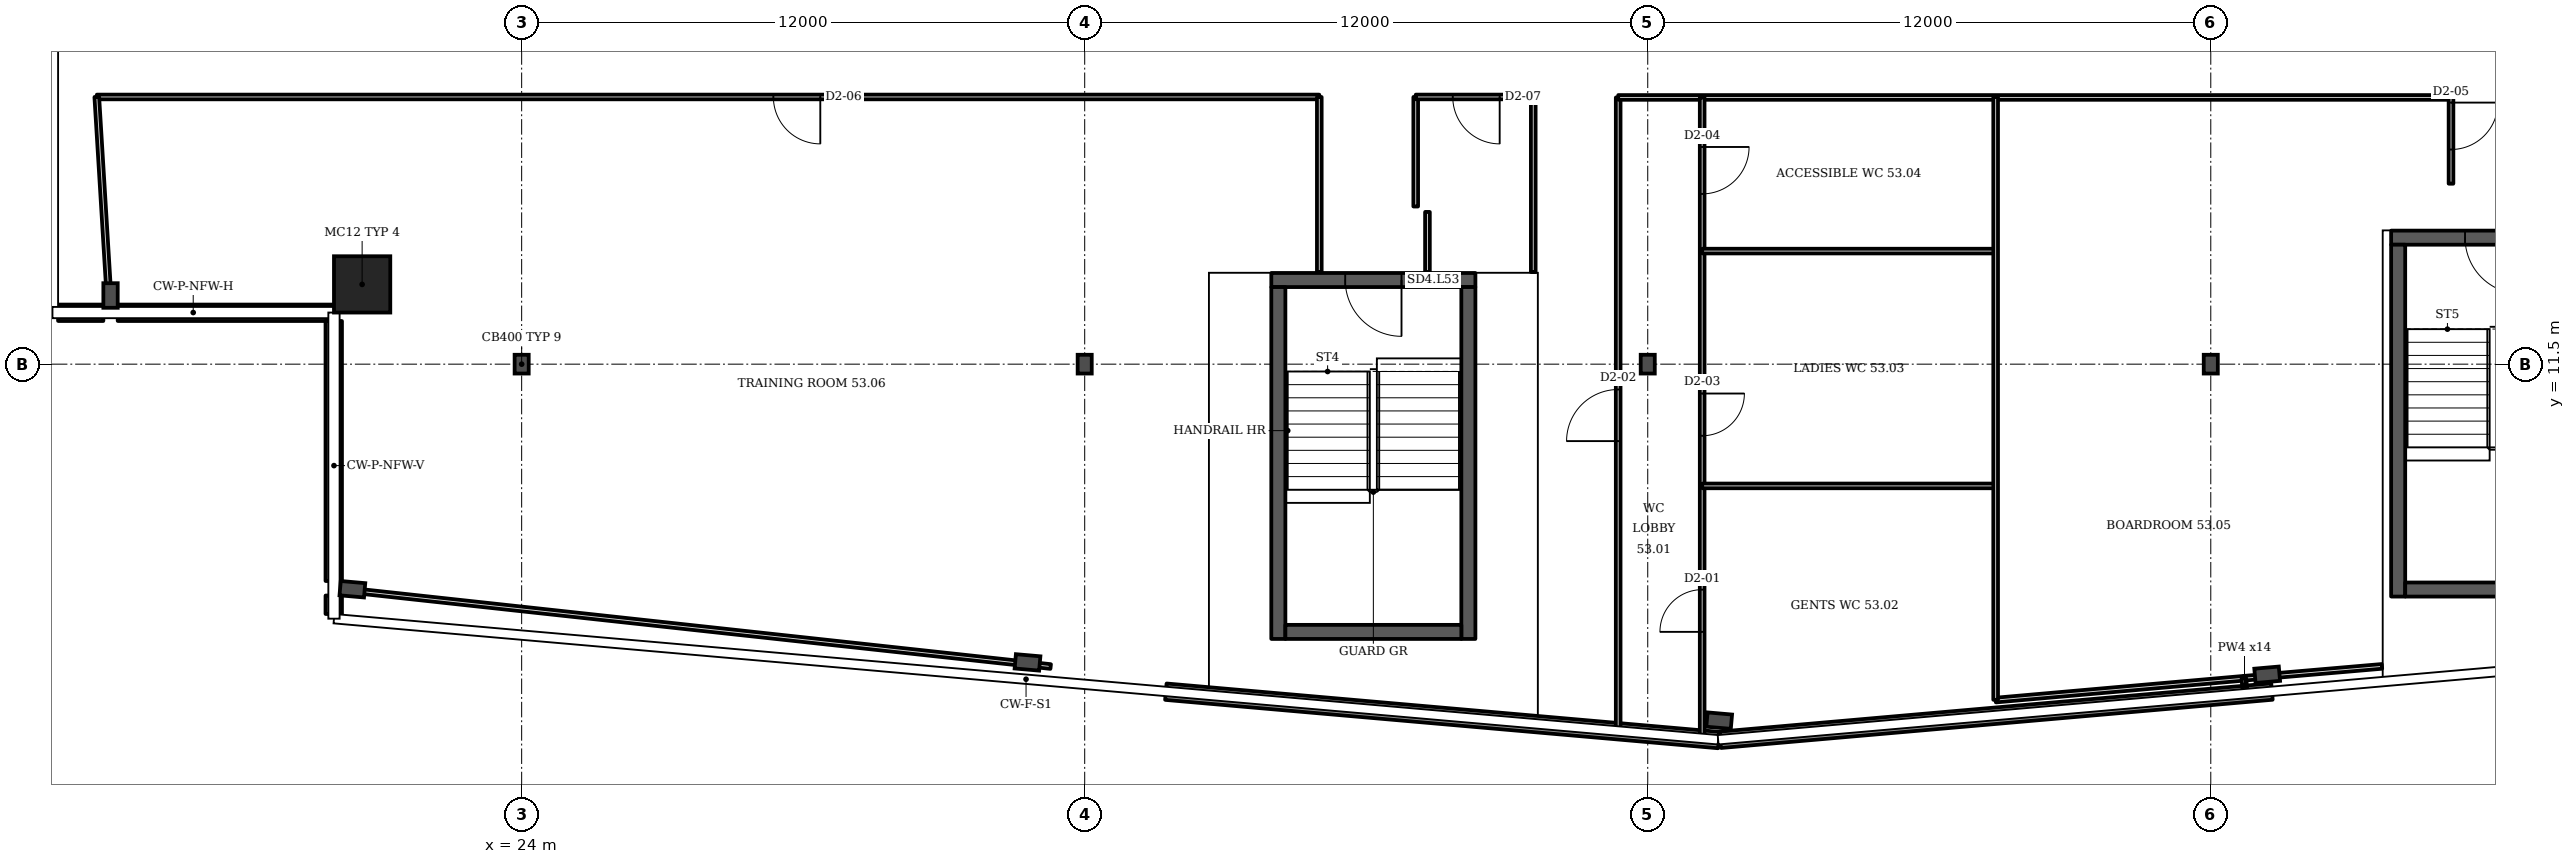
"""IFC4 building model, lengths in metres.
Left out: names, types, materials, properties, quantities, classifications, styles, units other than length and angle.
Written with IfcOpenShell. Run it as: python <this file> out.ifc"""

import sys

from ifc_helpers import new_model, si_unit, direction, frame, frame_2d, origin, origin_2d, place, context, subcontext, project, spatial, rectangle, i_section, extrude, element, fill, save


model = new_model("IFC4")
c1 = context("Model", 3, precision=1e-05, world=origin(), true_north=direction((0.0, 1.0)))
c2 = subcontext(c1, "Body", "Model", "MODEL_VIEW")
j1 = project(units=[si_unit("LENGTHUNIT", "METRE"), si_unit("PLANEANGLEUNIT", "RADIAN")], contexts=[c1])
p1 = place(None, origin())
s1 = spatial("IfcSite", under=j1, at=p1, CompositionType="ELEMENT")
p2 = place(p1, origin())
s2 = spatial("IfcBuilding", under=s1, at=p2, CompositionType="ELEMENT")
p3 = place(p2, frame((0.0, 0.0, 214.3)))
s3 = spatial("IfcBuildingStorey", under=s2, at=p3, CompositionType="ELEMENT", Elevation=214.3)
p4 = place(p3, frame((20.6, 13.2, 0.0), z_axis=(0.0, 0.0, 1.0), x_axis=(1.0, 0.0, 0.0)))
e1 = element("IfcColumn", 1, at=p4, inside=s3, PredefinedType="COLUMN", context=c2, shape_type="SweptSolid", body=[
    extrude(rectangle(XDim=1.2, YDim=1.2, at=origin_2d()), origin(), (0.0, 0.0, 1.0), 3.6),
])
for number, where, z_axis, x_axis in (
    (2, (20.392, 6.703, 0.0), (0.0, 0.0, 1.0), (-0.087, -0.996, 0.0)),
    (3, (34.781, 5.143, 0.0), (0.0, 0.0, 1.0), (-0.087, -0.996, 0.0)),
    (4, (49.523, 3.902, 0.0), (0.0, 0.0, 1.0), (-0.087, -0.996, 0.0)),
    (5, (61.202, 4.879, 0.0), (0.0, 0.0, 1.0), (0.087, -0.996, 0.0)),
    (6, (15.238, 12.963, 0.0), (0.0, 0.0, 1.0), (-1.0, 0.0, 0.0)),
):
    element("IfcColumn", number, at=place(p3, frame(where, z_axis=z_axis, x_axis=x_axis)), inside=s3, PredefinedType="COLUMN", context=c2, shape_type="SweptSolid", body=[
        extrude(i_section(OverallWidth=0.306, OverallDepth=0.524, WebThickness=0.021, FlangeThickness=0.04, FilletRadius=0.027, at=origin_2d()), origin(), (0.0, 0.0, 1.0), 3.6),
    ])
for number, where, z_axis, x_axis in (
    (7, (24.0, 11.5, 0.0), (0.0, 0.0, 1.0), (1.0, 0.0, 0.0)),
    (8, (36.0, 11.5, 0.0), (0.0, 0.0, 1.0), (1.0, 0.0, 0.0)),
    (9, (48.0, 11.5, 0.0), (0.0, 0.0, 1.0), (1.0, 0.0, 0.0)),
    (10, (60.0, 11.5, 0.0), (0.0, 0.0, 1.0), (1.0, 0.0, 0.0)),
):
    element("IfcColumn", number, at=place(p3, frame(where, z_axis=z_axis, x_axis=x_axis)), inside=s3, PredefinedType="COLUMN", context=c2, shape_type="SweptSolid", body=[
        extrude(i_section(OverallWidth=0.3, OverallDepth=0.4, WebThickness=0.013, FlangeThickness=0.024, FilletRadius=0.027, at=origin_2d()), origin(), (0.0, 0.0, 1.0), 3.6),
    ])
p5 = place(p3, frame((37.729, 4.519, 0.0), z_axis=(0.0, 0.0, 1.0), x_axis=(0.99619, -0.087167, 0.0)))
e11 = element("IfcWall", 11, at=p5, inside=s3, PredefinedType="SOLIDWALL", context=c2, shape_type="SweptSolid", body=[
    extrude(rectangle(XDim=11.831, YDim=0.35, at=frame_2d((5.915, 0.0))), origin(), (0.0, 0.0, 1.0), 1.0),
])
p6 = place(p3, frame((49.545, 3.493, 0.0), z_axis=(0.0, 0.0, 1.0), x_axis=(0.996196, 0.087141, 0.0)))
e12 = element("IfcWall", 12, at=p6, inside=s3, PredefinedType="SOLIDWALL", context=c2, shape_type="SweptSolid", body=[
    extrude(rectangle(XDim=11.803, YDim=0.35, at=frame_2d((5.902, 0.0))), origin(), (0.0, 0.0, 1.0), 1.0),
])
p7 = place(p3, frame((14.12, 12.595, 0.0), z_axis=(0.0, 0.0, 1.0), x_axis=(1.0, 0.0, 0.0)))
e13 = element("IfcWall", 13, at=p7, inside=s3, PredefinedType="SOLIDWALL", context=c2, shape_type="SweptSolid", body=[
    extrude(rectangle(XDim=0.965, YDim=0.35, at=frame_2d((0.482, 0.0))), origin(), (0.0, 0.0, 1.0), 1.0),
])
p8 = place(p3, frame((15.391, 12.595, 0.0), z_axis=(0.0, 0.0, 1.0), x_axis=(1.0, 0.0, 0.0)))
e14 = element("IfcWall", 14, at=p8, inside=s3, PredefinedType="SOLIDWALL", context=c2, shape_type="SweptSolid", body=[
    extrude(rectangle(XDim=4.609, YDim=0.35, at=frame_2d((2.305, 0.0))), origin(), (0.0, 0.0, 1.0), 1.0),
])
p9 = place(p3, frame((19.995, 12.42, 0.0), z_axis=(0.0, 0.0, 1.0), x_axis=(0.0, -1.0, 0.0)))
e15 = element("IfcWall", 15, at=p9, inside=s3, PredefinedType="SOLIDWALL", context=c2, shape_type="SweptSolid", body=[
    extrude(rectangle(XDim=5.542, YDim=0.35, at=frame_2d((2.771, 0.0))), origin(), (0.0, 0.0, 1.0), 1.0),
])
p10 = place(p3, frame((19.995, 6.568, 0.0), z_axis=(0.0, 0.0, 1.0), x_axis=(0.0, -1.0, 0.0)))
e16 = element("IfcWall", 16, at=p10, inside=s3, PredefinedType="SOLIDWALL", context=c2, shape_type="SweptSolid", body=[
    extrude(rectangle(XDim=0.394, YDim=0.35, at=frame_2d((0.197, 0.0))), origin(), (0.0, 0.0, 1.0), 1.0),
])
p11 = place(p3, frame((39.977, 13.293, 0.0), z_axis=(0.0, 0.0, 1.0), x_axis=(1.0, 0.0, 0.0)))
e17 = element("IfcWall", 17, at=p11, inside=s3, PredefinedType="SHEAR", context=c2, shape_type="SweptSolid", body=[
    extrude(rectangle(XDim=4.35, YDim=0.3, at=frame_2d((2.175, 0.0))), origin(), (0.0, 0.0, 1.0), 3.2),
])
p12 = place(p11, frame((1.575, 0.0, 0.0)))
e18 = element("IfcOpeningElement", 18, at=p12, cuts=e17, PredefinedType="OPENING", context=c2, shape_type="SweptSolid", body=[
    extrude(rectangle(XDim=1.2, YDim=2.1, at=frame_2d((0.6, 1.05))), frame((0.0, 0.16, 0.0), z_axis=(0.0, -1.0, 0.0), x_axis=(1.0, 0.0, 0.0)), (0.0, 0.0, 1.0), 0.32),
])
p13 = place(p3, frame((63.844, 14.196, 0.0), z_axis=(0.0, 0.0, 1.0), x_axis=(1.0, 0.0, 0.0)))
e19 = element("IfcWall", 19, at=p13, inside=s3, PredefinedType="SHEAR", context=c2, shape_type="SweptSolid", body=[
    extrude(rectangle(XDim=4.35, YDim=0.3, at=frame_2d((2.175, 0.0))), origin(), (0.0, 0.0, 1.0), 3.2),
])
p14 = place(p13, frame((1.575, 0.0, 0.0)))
e20 = element("IfcOpeningElement", 20, at=p14, cuts=e19, PredefinedType="OPENING", context=c2, shape_type="SweptSolid", body=[
    extrude(rectangle(XDim=1.2, YDim=2.1, at=frame_2d((0.6, 1.05))), frame((0.0, 0.16, 0.0), z_axis=(0.0, -1.0, 0.0), x_axis=(1.0, 0.0, 0.0)), (0.0, 0.0, 1.0), 0.32),
])
p15 = place(p3, frame((14.945, 17.195, 0.0), z_axis=(0.0, 0.0, 1.0), x_axis=(1.0, 0.0, 0.0)))
e21 = element("IfcWall", 21, at=p15, inside=s3, PredefinedType="PARTITIONING", context=c2, shape_type="SweptSolid", body=[
    extrude(rectangle(XDim=26.055, YDim=0.1, at=frame_2d((13.027, 0.0))), origin(), (0.0, 0.0, 1.0), 3.2),
])
p16 = place(p15, frame((14.42, 0.0, 0.0)))
e22 = element("IfcOpeningElement", 22, at=p16, cuts=e21, PredefinedType="OPENING", context=c2, shape_type="SweptSolid", body=[
    extrude(rectangle(XDim=1.0, YDim=2.1, at=frame_2d((0.5, 1.05))), frame((0.0, 0.06, 0.0), z_axis=(0.0, -1.0, 0.0), x_axis=(1.0, 0.0, 0.0)), (0.0, 0.0, 1.0), 0.12),
])
p17 = place(p3, frame((15.224, 12.62, 0.0), z_axis=(0.0, 0.0, 1.0), x_axis=(-0.060903, 0.99814, 0.0)))
e23 = element("IfcWall", 23, at=p17, inside=s3, PredefinedType="PARTITIONING", context=c2, shape_type="SweptSolid", body=[
    extrude(rectangle(XDim=4.586, YDim=0.1, at=frame_2d((2.293, 0.0))), origin(), (0.0, 0.0, 1.0), 2.58),
])
p18 = place(p3, frame((35.275, 5.055, 0.0), z_axis=(0.0, 0.0, 1.0), x_axis=(-0.994128, 0.108228, 0.0)))
e24 = element("IfcWall", 24, at=p18, inside=s3, PredefinedType="PARTITIONING", context=c2, shape_type="SweptSolid", body=[
    extrude(rectangle(XDim=15.335, YDim=0.1, at=frame_2d((7.667, 0.0))), origin(), (0.0, 0.0, 1.0), 2.58),
])
p19 = place(p3, frame((41.0, 13.463, 0.0), z_axis=(0.0, 0.0, 1.0), x_axis=(0.0, 1.0, 0.0)))
e25 = element("IfcWall", 25, at=p19, inside=s3, PredefinedType="PARTITIONING", context=c2, shape_type="SweptSolid", body=[
    extrude(rectangle(XDim=3.732, YDim=0.1, at=frame_2d((1.866, 0.0))), origin(), (0.0, 0.0, 1.0), 3.2),
])
p20 = place(p3, frame((43.055, 14.86, 0.0), z_axis=(0.0, 0.0, 1.0), x_axis=(0.0, 1.0, 0.0)))
e26 = element("IfcWall", 26, at=p20, inside=s3, PredefinedType="PARTITIONING", context=c2, shape_type="SweptSolid", body=[
    extrude(rectangle(XDim=2.335, YDim=0.1, at=frame_2d((1.167, 0.0))), origin(), (0.0, 0.0, 1.0), 3.2),
])
p21 = place(p3, frame((43.055, 17.195, 0.0), z_axis=(0.0, 0.0, 1.0), x_axis=(1.0, 0.0, 0.0)))
e27 = element("IfcWall", 27, at=p21, inside=s3, PredefinedType="PARTITIONING", context=c2, shape_type="SweptSolid", body=[
    extrude(rectangle(XDim=2.505, YDim=0.1, at=frame_2d((1.252, 0.0))), origin(), (0.0, 0.0, 1.0), 3.2),
])
p22 = place(p21, frame((0.789, 0.0, 0.0)))
e28 = element("IfcOpeningElement", 28, at=p22, cuts=e27, PredefinedType="OPENING", context=c2, shape_type="SweptSolid", body=[
    extrude(rectangle(XDim=1.0, YDim=2.1, at=frame_2d((0.5, 1.05))), frame((0.0, 0.06, 0.0), z_axis=(0.0, -1.0, 0.0), x_axis=(1.0, 0.0, 0.0)), (0.0, 0.0, 1.0), 0.12),
])
p23 = place(p3, frame((43.305, 13.463, 0.0), z_axis=(0.0, 0.0, 1.0), x_axis=(0.0, 1.0, 0.0)))
e29 = element("IfcWall", 29, at=p23, inside=s3, PredefinedType="PARTITIONING", context=c2, shape_type="SweptSolid", body=[
    extrude(rectangle(XDim=1.282, YDim=0.1, at=frame_2d((0.641, 0.0))), origin(), (0.0, 0.0, 1.0), 3.2),
])
p24 = place(p3, frame((45.56, 13.463, 0.0), z_axis=(0.0, 0.0, 1.0), x_axis=(0.0, 1.0, 0.0)))
e30 = element("IfcWall", 30, at=p24, inside=s3, PredefinedType="PARTITIONING", context=c2, shape_type="SweptSolid", body=[
    extrude(rectangle(XDim=3.732, YDim=0.1, at=frame_2d((1.866, 0.0))), origin(), (0.0, 0.0, 1.0), 3.2),
])
p25 = place(p3, frame((47.37, 3.701, 0.0), z_axis=(0.0, 0.0, 1.0), x_axis=(0.0, 1.0, 0.0)))
e31 = element("IfcWall", 31, at=p25, inside=s3, PredefinedType="PARTITIONING", context=c2, shape_type="SweptSolid", body=[
    extrude(rectangle(XDim=13.484, YDim=0.1, at=frame_2d((6.742, 0.0))), origin(), (0.0, 0.0, 1.0), 2.58),
])
p26 = place(p25, frame((6.159, 0.0, 0.0)))
e32 = element("IfcOpeningElement", 32, at=p26, cuts=e31, PredefinedType="OPENING", context=c2, shape_type="SweptSolid", body=[
    extrude(rectangle(XDim=1.1, YDim=2.1, at=frame_2d((0.55, 1.05))), frame((0.0, 0.06, 0.0), z_axis=(0.0, -1.0, 0.0), x_axis=(1.0, 0.0, 0.0)), (0.0, 0.0, 1.0), 0.12),
])
p27 = place(p3, frame((47.37, 17.185, 0.0), z_axis=(0.0, 0.0, 1.0), x_axis=(1.0, 0.0, 0.0)))
e33 = element("IfcWall", 33, at=p27, inside=s3, PredefinedType="PARTITIONING", context=c2, shape_type="SweptSolid", body=[
    extrude(rectangle(XDim=17.75, YDim=0.1, at=frame_2d((8.875, 0.0))), origin(), (0.0, 0.0, 1.0), 3.2),
])
p28 = place(p3, frame((49.16, 3.544, 0.0), z_axis=(0.0, 0.0, 1.0), x_axis=(0.0, 1.0, 0.0)))
e34 = element("IfcWall", 34, at=p28, inside=s3, PredefinedType="PARTITIONING", context=c2, shape_type="SweptSolid", body=[
    extrude(rectangle(XDim=13.641, YDim=0.1, at=frame_2d((6.821, 0.0))), origin(), (0.0, 0.0, 1.0), 2.58),
])
p29 = place(p28, frame((2.25, 0.0, 0.0)))
e35 = element("IfcOpeningElement", 35, at=p29, cuts=e34, PredefinedType="OPENING", context=c2, shape_type="SweptSolid", body=[
    extrude(rectangle(XDim=0.9, YDim=2.1, at=frame_2d((0.45, 1.05))), frame((0.0, 0.06, 0.0), z_axis=(0.0, -1.0, 0.0), x_axis=(1.0, 0.0, 0.0)), (0.0, 0.0, 1.0), 0.12),
])
p30 = place(p28, frame((6.43, 0.0, 0.0)))
e36 = element("IfcOpeningElement", 36, at=p30, cuts=e34, PredefinedType="OPENING", context=c2, shape_type="SweptSolid", body=[
    extrude(rectangle(XDim=0.9, YDim=2.1, at=frame_2d((0.45, 1.05))), frame((0.0, 0.06, 0.0), z_axis=(0.0, -1.0, 0.0), x_axis=(1.0, 0.0, 0.0)), (0.0, 0.0, 1.0), 0.12),
])
p31 = place(p28, frame((11.585, 0.0, 0.0)))
e37 = element("IfcOpeningElement", 37, at=p31, cuts=e34, PredefinedType="OPENING", context=c2, shape_type="SweptSolid", body=[
    extrude(rectangle(XDim=1.0, YDim=2.1, at=frame_2d((0.5, 1.05))), frame((0.0, 0.06, 0.0), z_axis=(0.0, -1.0, 0.0), x_axis=(1.0, 0.0, 0.0)), (0.0, 0.0, 1.0), 0.12),
])
for number, where, z_axis, x_axis in (
    (38, (49.16, 8.905, 0.0), (0.0, 0.0, 1.0), (1.0, 0.0, 0.0)),
    (39, (49.16, 13.91, 0.0), (0.0, 0.0, 1.0), (1.0, 0.0, 0.0)),
):
    element("IfcWall", number, at=place(p3, frame(where, z_axis=z_axis, x_axis=x_axis)), inside=s3, PredefinedType="PARTITIONING", context=c2, shape_type="SweptSolid", body=[
        extrude(rectangle(XDim=6.255, YDim=0.1, at=frame_2d((3.127, 0.0))), origin(), (0.0, 0.0, 1.0), 3.2),
    ])
p32 = place(p3, frame((55.415, 4.34, 0.0), z_axis=(0.0, 0.0, 1.0), x_axis=(0.996159, 0.087534, 0.0)))
e40 = element("IfcWall", 40, at=p32, inside=s3, PredefinedType="PARTITIONING", context=c2, shape_type="SweptSolid", body=[
    extrude(rectangle(XDim=5.31, YDim=0.1, at=frame_2d((2.655, 0.0))), origin(), (0.0, 0.0, 1.0), 2.58),
])
p33 = place(p3, frame((55.415, 4.345, 0.0), z_axis=(0.0, 0.0, 1.0), x_axis=(0.0, 1.0, 0.0)))
e41 = element("IfcWall", 41, at=p33, inside=s3, PredefinedType="PARTITIONING", context=c2, shape_type="SweptSolid", body=[
    extrude(rectangle(XDim=12.85, YDim=0.1, at=frame_2d((6.425, 0.0))), origin(), (0.0, 0.0, 1.0), 3.2),
])
p34 = place(p3, frame((60.705, 4.805, 0.0), z_axis=(0.0, 0.0, 1.0), x_axis=(0.996324, 0.085692, 0.0)))
e42 = element("IfcWall", 42, at=p34, inside=s3, PredefinedType="PARTITIONING", context=c2, shape_type="SweptSolid", body=[
    extrude(rectangle(XDim=2.955, YDim=0.1, at=frame_2d((1.477, 0.0))), origin(), (0.0, 0.0, 1.0), 2.58),
])
p35 = place(p3, frame((60.733, 4.497, 0.0), z_axis=(0.0, 0.0, 1.0), x_axis=(-0.090037, 0.995936, 0.0)))
e43 = element("IfcWall", 43, at=p35, inside=s3, PredefinedType="PARTITIONING", context=c2, shape_type="SweptSolid", body=[
    extrude(rectangle(XDim=0.309, YDim=0.1, at=frame_2d((0.155, 0.0))), origin(), (0.0, 0.0, 1.0), 3.2),
])
p36 = place(p3, frame((65.12, 15.346, 0.0), z_axis=(0.0, 0.0, 1.0), x_axis=(0.0, 1.0, 0.0)))
e44 = element("IfcWall", 44, at=p36, inside=s3, PredefinedType="PARTITIONING", context=c2, shape_type="SweptSolid", body=[
    extrude(rectangle(XDim=1.849, YDim=0.1, at=frame_2d((0.924, 0.0))), origin(), (0.0, 0.0, 1.0), 3.2),
])
p37 = place(p36, frame((0.729, 0.0, 0.0)))
e45 = element("IfcOpeningElement", 45, at=p37, cuts=e44, PredefinedType="OPENING", context=c2, shape_type="SweptSolid", body=[
    extrude(rectangle(XDim=1.0, YDim=2.1, at=frame_2d((0.5, 1.05))), frame((0.0, 0.06, 0.0), z_axis=(0.0, -1.0, 0.0), x_axis=(1.0, 0.0, 0.0)), (0.0, 0.0, 1.0), 0.12),
])
for number, where, z_axis, x_axis in (
    (46, (40.127, 5.643, 0.0), (0.0, 0.0, 1.0), (0.0, 1.0, 0.0)),
    (47, (44.177, 5.643, 0.0), (0.0, 0.0, 1.0), (0.0, 1.0, 0.0)),
):
    element("IfcWall", number, at=place(p3, frame(where, z_axis=z_axis, x_axis=x_axis)), inside=s3, PredefinedType="SHEAR", context=c2, shape_type="SweptSolid", body=[
        extrude(rectangle(XDim=7.5, YDim=0.3, at=frame_2d((3.75, 0.0))), origin(), (0.0, 0.0, 1.0), 3.2),
    ])
p38 = place(p3, frame((40.277, 5.793, 0.0), z_axis=(0.0, 0.0, 1.0), x_axis=(1.0, 0.0, 0.0)))
e48 = element("IfcWall", 48, at=p38, inside=s3, PredefinedType="SHEAR", context=c2, shape_type="SweptSolid", body=[
    extrude(rectangle(XDim=3.75, YDim=0.3, at=frame_2d((1.875, 0.0))), origin(), (0.0, 0.0, 1.0), 3.2),
])
p39 = place(p3, frame((63.994, 6.546, 0.0), z_axis=(0.0, 0.0, 1.0), x_axis=(0.0, 1.0, 0.0)))
e49 = element("IfcWall", 49, at=p39, inside=s3, PredefinedType="SHEAR", context=c2, shape_type="SweptSolid", body=[
    extrude(rectangle(XDim=7.5, YDim=0.3, at=frame_2d((3.75, 0.0))), origin(), (0.0, 0.0, 1.0), 3.2),
])
p40 = place(p3, frame((64.144, 6.696, 0.0), z_axis=(0.0, 0.0, 1.0), x_axis=(1.0, 0.0, 0.0)))
e50 = element("IfcWall", 50, at=p40, inside=s3, PredefinedType="SHEAR", context=c2, shape_type="SweptSolid", body=[
    extrude(rectangle(XDim=3.75, YDim=0.3, at=frame_2d((1.875, 0.0))), origin(), (0.0, 0.0, 1.0), 3.2),
])
p41 = place(p12, origin())
e51 = element("IfcDoor", 51, at=p41, inside=s3, OperationType="SINGLE_SWING_RIGHT", PredefinedType="DOOR", context=c2, shape_type="SweptSolid", body=[
    extrude(rectangle(XDim=1.2, YDim=2.1, at=frame_2d((0.6, 1.05))), frame((0.0, 0.025, 0.0), z_axis=(0.0, -1.0, 0.0), x_axis=(1.0, 0.0, 0.0)), (0.0, 0.0, 1.0), 0.05),
])
fill(e18, e51)
p42 = place(p14, origin())
e52 = element("IfcDoor", 52, at=p42, inside=s3, OperationType="SINGLE_SWING_RIGHT", PredefinedType="DOOR", context=c2, shape_type="SweptSolid", body=[
    extrude(rectangle(XDim=1.2, YDim=2.1, at=frame_2d((0.6, 1.05))), frame((0.0, 0.025, 0.0), z_axis=(0.0, -1.0, 0.0), x_axis=(1.0, 0.0, 0.0)), (0.0, 0.0, 1.0), 0.05),
])
fill(e20, e52)
p43 = place(p29, origin())
e53 = element("IfcDoor", 53, at=p43, inside=s3, OperationType="SINGLE_SWING_LEFT", PredefinedType="DOOR", context=c2, shape_type="SweptSolid", body=[
    extrude(rectangle(XDim=0.9, YDim=2.1, at=frame_2d((0.45, 1.05))), frame((0.0, 0.025, 0.0), z_axis=(0.0, -1.0, 0.0), x_axis=(1.0, 0.0, 0.0)), (0.0, 0.0, 1.0), 0.05),
])
fill(e35, e53)
p44 = place(p26, origin())
e54 = element("IfcDoor", 54, at=p44, inside=s3, OperationType="SINGLE_SWING_LEFT", PredefinedType="DOOR", context=c2, shape_type="SweptSolid", body=[
    extrude(rectangle(XDim=1.1, YDim=2.1, at=frame_2d((0.55, 1.05))), frame((0.0, 0.025, 0.0), z_axis=(0.0, -1.0, 0.0), x_axis=(1.0, 0.0, 0.0)), (0.0, 0.0, 1.0), 0.05),
])
fill(e32, e54)
p45 = place(p30, origin())
e55 = element("IfcDoor", 55, at=p45, inside=s3, OperationType="SINGLE_SWING_RIGHT", PredefinedType="DOOR", context=c2, shape_type="SweptSolid", body=[
    extrude(rectangle(XDim=0.9, YDim=2.1, at=frame_2d((0.45, 1.05))), frame((0.0, 0.025, 0.0), z_axis=(0.0, -1.0, 0.0), x_axis=(1.0, 0.0, 0.0)), (0.0, 0.0, 1.0), 0.05),
])
fill(e36, e55)
p46 = place(p31, origin())
e56 = element("IfcDoor", 56, at=p46, inside=s3, OperationType="SINGLE_SWING_RIGHT", PredefinedType="DOOR", context=c2, shape_type="SweptSolid", body=[
    extrude(rectangle(XDim=1.0, YDim=2.1, at=frame_2d((0.5, 1.05))), frame((0.0, 0.025, 0.0), z_axis=(0.0, -1.0, 0.0), x_axis=(1.0, 0.0, 0.0)), (0.0, 0.0, 1.0), 0.05),
])
fill(e37, e56)
p47 = place(p37, origin())
e57 = element("IfcDoor", 57, at=p47, inside=s3, OperationType="SINGLE_SWING_RIGHT", PredefinedType="DOOR", context=c2, shape_type="SweptSolid", body=[
    extrude(rectangle(XDim=1.0, YDim=2.1, at=frame_2d((0.5, 1.05))), frame((0.0, 0.025, 0.0), z_axis=(0.0, -1.0, 0.0), x_axis=(1.0, 0.0, 0.0)), (0.0, 0.0, 1.0), 0.05),
])
fill(e45, e57)
p48 = place(p16, origin())
e58 = element("IfcDoor", 58, at=p48, inside=s3, OperationType="SINGLE_SWING_RIGHT", PredefinedType="DOOR", context=c2, shape_type="SweptSolid", body=[
    extrude(rectangle(XDim=1.0, YDim=2.1, at=frame_2d((0.5, 1.05))), frame((0.0, 0.025, 0.0), z_axis=(0.0, -1.0, 0.0), x_axis=(1.0, 0.0, 0.0)), (0.0, 0.0, 1.0), 0.05),
])
fill(e22, e58)
p49 = place(p22, origin())
e59 = element("IfcDoor", 59, at=p49, inside=s3, OperationType="SINGLE_SWING_RIGHT", PredefinedType="DOOR", context=c2, shape_type="SweptSolid", body=[
    extrude(rectangle(XDim=1.0, YDim=2.1, at=frame_2d((0.5, 1.05))), frame((0.0, 0.025, 0.0), z_axis=(0.0, -1.0, 0.0), x_axis=(1.0, 0.0, 0.0)), (0.0, 0.0, 1.0), 0.05),
])
fill(e28, e59)
save(model, sys.argv[1])
